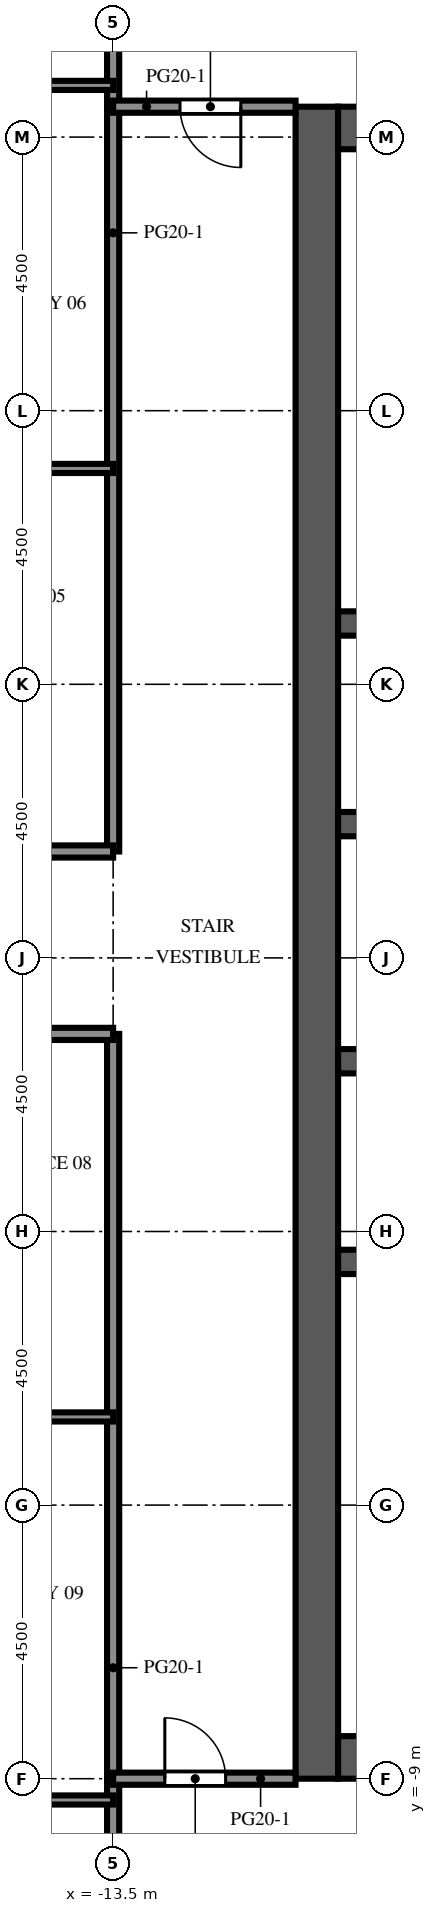
"""IFC4 building model, lengths in metres.
Left out: names, types, materials, properties, quantities, classifications, styles, units other than length and angle.
Written with IfcOpenShell. Run it as: python <this file> out.ifc"""

import sys

from ifc_helpers import new_model, si_unit, direction, frame, frame_2d, origin, place, context, subcontext, project, spatial, rectangle, extrude, element, fill, save


model = new_model("IFC4")
c1 = context("Model", 3, precision=1e-05, world=origin(), true_north=direction((0.0, 1.0)))
c2 = subcontext(c1, "Body", "Model", "MODEL_VIEW")
j1 = project(units=[si_unit("LENGTHUNIT", "METRE"), si_unit("PLANEANGLEUNIT", "RADIAN")], contexts=[c1])
p1 = place(None, origin())
s1 = spatial("IfcSite", under=j1, at=p1, CompositionType="ELEMENT")
p2 = place(p1, origin())
s2 = spatial("IfcBuilding", under=s1, at=p2, CompositionType="ELEMENT")
p3 = place(p2, frame((0.0, 0.0, 286.8)))
s3 = spatial("IfcBuildingStorey", under=s2, at=p3, CompositionType="ELEMENT", Elevation=286.8)
p4 = place(p3, frame((-10.15, -9.0, 0.0), z_axis=(0.0, 0.0, 1.0), x_axis=(0.0, 1.0, 0.0)))
e1 = element("IfcWall", 1, at=p4, inside=s3, PredefinedType="SHEAR", context=c2, shape_type="SweptSolid", body=[
    extrude(rectangle(XDim=27.5, YDim=0.7, at=frame_2d((13.75, 0.0))), origin(), (0.0, 0.0, 1.0), 4.1),
])
p5 = place(p4, frame((12.55, 0.0, 0.0)))
e2 = element("IfcOpeningElement", 2, at=p5, cuts=e1, PredefinedType="OPENING", context=c2, shape_type="SweptSolid", body=[
    extrude(rectangle(XDim=2.4, YDim=2.4, at=frame_2d((1.2, 1.2))), frame((0.0, 0.36, 0.0), z_axis=(0.0, -1.0, 0.0), x_axis=(1.0, 0.0, 0.0)), (0.0, 0.0, 1.0), 0.72),
])
p6 = place(p4, frame((6.825, 0.0, 0.0)))
e3 = element("IfcOpeningElement", 3, at=p6, cuts=e1, PredefinedType="OPENING", context=c2, shape_type="SweptSolid", body=[
    extrude(rectangle(XDim=1.2, YDim=2.1, at=frame_2d((0.6, 1.05))), frame((0.0, 0.36, 0.0), z_axis=(0.0, -1.0, 0.0), x_axis=(1.0, 0.0, 0.0)), (0.0, 0.0, 1.0), 0.72),
])
p7 = place(p4, frame((19.475, 0.0, 0.0)))
e4 = element("IfcOpeningElement", 4, at=p7, cuts=e1, PredefinedType="OPENING", context=c2, shape_type="SweptSolid", body=[
    extrude(rectangle(XDim=1.2, YDim=2.1, at=frame_2d((0.6, 1.05))), frame((0.0, 0.36, 0.0), z_axis=(0.0, -1.0, 0.0), x_axis=(1.0, 0.0, 0.0)), (0.0, 0.0, 1.0), 0.72),
])
for number, where, z_axis, x_axis in (
    (5, (-9.8, -8.65, 0.0), (0.0, 0.0, 1.0), (1.0, 0.0, 0.0)),
    (6, (-9.8, 18.15, 0.0), (0.0, 0.0, 1.0), (1.0, 0.0, 0.0)),
):
    element("IfcWall", number, at=place(p3, frame(where, z_axis=z_axis, x_axis=x_axis)), inside=s3, PredefinedType="SHEAR", context=c2, shape_type="SweptSolid", body=[
        extrude(rectangle(XDim=10.6, YDim=0.7, at=frame_2d((5.3, 0.0))), origin(), (0.0, 0.0, 1.0), 4.1),
    ])
p8 = place(p3, frame((-9.8, -0.5, 0.0), z_axis=(0.0, 0.0, 1.0), x_axis=(1.0, 0.0, 0.0)))
e7 = element("IfcWall", 7, at=p8, inside=s3, PredefinedType="SHEAR", context=c2, shape_type="SweptSolid", body=[
    extrude(rectangle(XDim=10.6, YDim=0.4, at=frame_2d((5.3, 0.0))), origin(), (0.0, 0.0, 1.0), 4.1),
])
p9 = place(p3, frame((-9.8, 2.8, 0.0), z_axis=(0.0, 0.0, 1.0), x_axis=(1.0, 0.0, 0.0)))
e8 = element("IfcWall", 8, at=p9, inside=s3, PredefinedType="SHEAR", context=c2, shape_type="SweptSolid", body=[
    extrude(rectangle(XDim=10.6, YDim=0.4, at=frame_2d((5.3, 0.0))), origin(), (0.0, 0.0, 1.0), 4.1),
])
p10 = place(p9, frame((0.688, 0.0, 0.0)))
e9 = element("IfcOpeningElement", 9, at=p10, cuts=e8, PredefinedType="OPENING", context=c2, shape_type="SweptSolid", body=[
    extrude(rectangle(XDim=1.1, YDim=2.1, at=frame_2d((0.55, 1.05))), frame((0.0, 0.21, 0.0), z_axis=(0.0, -1.0, 0.0), x_axis=(1.0, 0.0, 0.0)), (0.0, 0.0, 1.0), 0.42),
])
p11 = place(p9, frame((3.438, 0.0, 0.0)))
e10 = element("IfcOpeningElement", 10, at=p11, cuts=e8, PredefinedType="OPENING", context=c2, shape_type="SweptSolid", body=[
    extrude(rectangle(XDim=1.1, YDim=2.1, at=frame_2d((0.55, 1.05))), frame((0.0, 0.21, 0.0), z_axis=(0.0, -1.0, 0.0), x_axis=(1.0, 0.0, 0.0)), (0.0, 0.0, 1.0), 0.42),
])
p12 = place(p9, frame((6.113, 0.0, 0.0)))
e11 = element("IfcOpeningElement", 11, at=p12, cuts=e8, PredefinedType="OPENING", context=c2, shape_type="SweptSolid", body=[
    extrude(rectangle(XDim=1.0, YDim=2.1, at=frame_2d((0.5, 1.05))), frame((0.0, 0.21, 0.0), z_axis=(0.0, -1.0, 0.0), x_axis=(1.0, 0.0, 0.0)), (0.0, 0.0, 1.0), 0.42),
])
p13 = place(p9, frame((8.863, 0.0, 0.0)))
e12 = element("IfcOpeningElement", 12, at=p13, cuts=e8, PredefinedType="OPENING", context=c2, shape_type="SweptSolid", body=[
    extrude(rectangle(XDim=1.0, YDim=2.1, at=frame_2d((0.5, 1.05))), frame((0.0, 0.21, 0.0), z_axis=(0.0, -1.0, 0.0), x_axis=(1.0, 0.0, 0.0)), (0.0, 0.0, 1.0), 0.42),
])
p14 = place(p3, frame((-9.8, 6.7, 0.0), z_axis=(0.0, 0.0, 1.0), x_axis=(1.0, 0.0, 0.0)))
e13 = element("IfcWall", 13, at=p14, inside=s3, PredefinedType="SHEAR", context=c2, shape_type="SweptSolid", body=[
    extrude(rectangle(XDim=10.6, YDim=0.4, at=frame_2d((5.3, 0.0))), origin(), (0.0, 0.0, 1.0), 4.1),
])
p15 = place(p14, frame((3.438, 0.0, 0.0)))
e14 = element("IfcOpeningElement", 14, at=p15, cuts=e13, PredefinedType="OPENING", context=c2, shape_type="SweptSolid", body=[
    extrude(rectangle(XDim=1.1, YDim=2.1, at=frame_2d((0.55, 1.05))), frame((0.0, 0.21, 0.0), z_axis=(0.0, -1.0, 0.0), x_axis=(1.0, 0.0, 0.0)), (0.0, 0.0, 1.0), 0.42),
])
p16 = place(p14, frame((6.062, 0.0, 0.0)))
e15 = element("IfcOpeningElement", 15, at=p16, cuts=e13, PredefinedType="OPENING", context=c2, shape_type="SweptSolid", body=[
    extrude(rectangle(XDim=1.1, YDim=2.1, at=frame_2d((0.55, 1.05))), frame((0.0, 0.21, 0.0), z_axis=(0.0, -1.0, 0.0), x_axis=(1.0, 0.0, 0.0)), (0.0, 0.0, 1.0), 0.42),
])
p17 = place(p14, frame((8.812, 0.0, 0.0)))
e16 = element("IfcOpeningElement", 16, at=p17, cuts=e13, PredefinedType="OPENING", context=c2, shape_type="SweptSolid", body=[
    extrude(rectangle(XDim=1.1, YDim=2.1, at=frame_2d((0.55, 1.05))), frame((0.0, 0.21, 0.0), z_axis=(0.0, -1.0, 0.0), x_axis=(1.0, 0.0, 0.0)), (0.0, 0.0, 1.0), 0.42),
])
p18 = place(p14, frame((0.738, 0.0, 0.0)))
e17 = element("IfcOpeningElement", 17, at=p18, cuts=e13, PredefinedType="OPENING", context=c2, shape_type="SweptSolid", body=[
    extrude(rectangle(XDim=1.0, YDim=2.1, at=frame_2d((0.5, 1.05))), frame((0.0, 0.21, 0.0), z_axis=(0.0, -1.0, 0.0), x_axis=(1.0, 0.0, 0.0)), (0.0, 0.0, 1.0), 0.42),
])
p19 = place(p3, frame((-9.8, 10.0, 0.0), z_axis=(0.0, 0.0, 1.0), x_axis=(1.0, 0.0, 0.0)))
e18 = element("IfcWall", 18, at=p19, inside=s3, PredefinedType="SHEAR", context=c2, shape_type="SweptSolid", body=[
    extrude(rectangle(XDim=10.6, YDim=0.4, at=frame_2d((5.3, 0.0))), origin(), (0.0, 0.0, 1.0), 4.1),
])
p20 = place(p3, frame((-13.5, -17.6, 0.0), z_axis=(0.0, 0.0, 1.0), x_axis=(0.0, 1.0, 0.0)))
e19 = element("IfcWall", 19, at=p20, inside=s3, PredefinedType="PARTITIONING", context=c2, shape_type="SweptSolid", body=[
    extrude(rectangle(XDim=20.85, YDim=0.2, at=frame_2d((10.425, 0.0))), origin(), (0.0, 0.0, 1.0), 3.65),
])
p21 = place(p3, frame((-13.5, 6.25, 0.0), z_axis=(0.0, 0.0, 1.0), x_axis=(0.0, 1.0, 0.0)))
e20 = element("IfcWall", 20, at=p21, inside=s3, PredefinedType="PARTITIONING", context=c2, shape_type="SweptSolid", body=[
    extrude(rectangle(XDim=20.35, YDim=0.2, at=frame_2d((10.175, 0.0))), origin(), (0.0, 0.0, 1.0), 3.65),
])
p22 = place(p3, frame((-17.5, -9.35, 0.0), z_axis=(0.0, 0.0, 1.0), x_axis=(1.0, 0.0, 0.0)))
e21 = element("IfcWall", 21, at=p22, inside=s3, PredefinedType="PARTITIONING", context=c2, shape_type="SweptSolid", body=[
    extrude(rectangle(XDim=4.0, YDim=0.15, at=frame_2d((2.0, 0.0))), origin(), (0.0, 0.0, 1.0), 3.65),
])
p23 = place(p3, frame((-10.5, -9.0, 0.0), z_axis=(0.0, 0.0, 1.0), x_axis=(-1.0, 0.0, 0.0)))
e22 = element("IfcWall", 22, at=p23, inside=s3, PredefinedType="PARTITIONING", context=c2, shape_type="SweptSolid", body=[
    extrude(rectangle(XDim=3.0, YDim=0.2, at=frame_2d((1.5, 0.0))), origin(), (0.0, 0.0, 1.0), 3.65),
])
p24 = place(p23, frame((1.15, 0.0, 0.0)))
e23 = element("IfcOpeningElement", 23, at=p24, cuts=e22, PredefinedType="OPENING", context=c2, shape_type="SweptSolid", body=[
    extrude(rectangle(XDim=1.0, YDim=2.1, at=frame_2d((0.5, 1.05))), frame((0.0, 0.11, 0.0), z_axis=(0.0, -1.0, 0.0), x_axis=(1.0, 0.0, 0.0)), (0.0, 0.0, 1.0), 0.22),
])
p25 = place(p3, frame((-13.5, -3.05, 0.0), z_axis=(0.0, 0.0, 1.0), x_axis=(-1.0, 0.0, 0.0)))
e24 = element("IfcWall", 24, at=p25, inside=s3, PredefinedType="PARTITIONING", context=c2, shape_type="SweptSolid", body=[
    extrude(rectangle(XDim=8.85, YDim=0.15, at=frame_2d((4.425, 0.0))), origin(), (0.0, 0.0, 1.0), 3.65),
])
p26 = place(p25, frame((5.4, 0.0, 0.0)))
e25 = element("IfcOpeningElement", 25, at=p26, cuts=e24, PredefinedType="OPENING", context=c2, shape_type="SweptSolid", body=[
    extrude(rectangle(XDim=1.0, YDim=2.1, at=frame_2d((0.5, 1.05))), frame((0.0, 0.085, 0.0), z_axis=(0.0, -1.0, 0.0), x_axis=(1.0, 0.0, 0.0)), (0.0, 0.0, 1.0), 0.17),
])
p27 = place(p3, frame((-13.5, 3.25, 0.0), z_axis=(0.0, 0.0, 1.0), x_axis=(-1.0, 0.0, 0.0)))
e26 = element("IfcWall", 26, at=p27, inside=s3, PredefinedType="PARTITIONING", context=c2, shape_type="SweptSolid", body=[
    extrude(rectangle(XDim=8.85, YDim=0.2, at=frame_2d((4.425, 0.0))), origin(), (0.0, 0.0, 1.0), 3.65),
])
p28 = place(p27, frame((5.15, 0.0, 0.0)))
e27 = element("IfcOpeningElement", 27, at=p28, cuts=e26, PredefinedType="OPENING", context=c2, shape_type="SweptSolid", body=[
    extrude(rectangle(XDim=1.0, YDim=2.1, at=frame_2d((0.5, 1.05))), frame((0.0, 0.11, 0.0), z_axis=(0.0, -1.0, 0.0), x_axis=(1.0, 0.0, 0.0)), (0.0, 0.0, 1.0), 0.22),
])
p29 = place(p3, frame((-22.35, 6.25, 0.0), z_axis=(0.0, 0.0, 1.0), x_axis=(1.0, 0.0, 0.0)))
e28 = element("IfcWall", 28, at=p29, inside=s3, PredefinedType="PARTITIONING", context=c2, shape_type="SweptSolid", body=[
    extrude(rectangle(XDim=8.85, YDim=0.2, at=frame_2d((4.425, 0.0))), origin(), (0.0, 0.0, 1.0), 3.65),
])
p30 = place(p29, frame((3.45, 0.0, 0.0)))
e29 = element("IfcOpeningElement", 29, at=p30, cuts=e28, PredefinedType="OPENING", context=c2, shape_type="SweptSolid", body=[
    extrude(rectangle(XDim=1.0, YDim=2.1, at=frame_2d((0.5, 1.05))), frame((0.0, 0.11, 0.0), z_axis=(0.0, -1.0, 0.0), x_axis=(1.0, 0.0, 0.0)), (0.0, 0.0, 1.0), 0.22),
])
p31 = place(p3, frame((-22.35, 12.55, 0.0), z_axis=(0.0, 0.0, 1.0), x_axis=(1.0, 0.0, 0.0)))
e30 = element("IfcWall", 30, at=p31, inside=s3, PredefinedType="PARTITIONING", context=c2, shape_type="SweptSolid", body=[
    extrude(rectangle(XDim=8.85, YDim=0.15, at=frame_2d((4.425, 0.0))), origin(), (0.0, 0.0, 1.0), 3.65),
])
p32 = place(p31, frame((4.2, 0.0, 0.0)))
e31 = element("IfcOpeningElement", 31, at=p32, cuts=e30, PredefinedType="OPENING", context=c2, shape_type="SweptSolid", body=[
    extrude(rectangle(XDim=1.0, YDim=2.1, at=frame_2d((0.5, 1.05))), frame((0.0, 0.085, 0.0), z_axis=(0.0, -1.0, 0.0), x_axis=(1.0, 0.0, 0.0)), (0.0, 0.0, 1.0), 0.17),
])
p33 = place(p3, frame((-13.5, 18.5, 0.0), z_axis=(0.0, 0.0, 1.0), x_axis=(1.0, 0.0, 0.0)))
e32 = element("IfcWall", 32, at=p33, inside=s3, PredefinedType="PARTITIONING", context=c2, shape_type="SweptSolid", body=[
    extrude(rectangle(XDim=3.0, YDim=0.2, at=frame_2d((1.5, 0.0))), origin(), (0.0, 0.0, 1.0), 3.65),
])
p34 = place(p33, frame((1.1, 0.0, 0.0)))
e33 = element("IfcOpeningElement", 33, at=p34, cuts=e32, PredefinedType="OPENING", context=c2, shape_type="SweptSolid", body=[
    extrude(rectangle(XDim=1.0, YDim=2.1, at=frame_2d((0.5, 1.05))), frame((0.0, 0.11, 0.0), z_axis=(0.0, -1.0, 0.0), x_axis=(1.0, 0.0, 0.0)), (0.0, 0.0, 1.0), 0.22),
])
p35 = place(p3, frame((-22.35, 18.85, 0.0), z_axis=(0.0, 0.0, 1.0), x_axis=(1.0, 0.0, 0.0)))
e34 = element("IfcWall", 34, at=p35, inside=s3, PredefinedType="PARTITIONING", context=c2, shape_type="SweptSolid", body=[
    extrude(rectangle(XDim=8.85, YDim=0.15, at=frame_2d((4.425, 0.0))), origin(), (0.0, 0.0, 1.0), 3.65),
])
p36 = place(p35, frame((2.7, 0.0, 0.0)))
e35 = element("IfcOpeningElement", 35, at=p36, cuts=e34, PredefinedType="OPENING", context=c2, shape_type="SweptSolid", body=[
    extrude(rectangle(XDim=1.0, YDim=2.1, at=frame_2d((0.5, 1.05))), frame((0.0, 0.085, 0.0), z_axis=(0.0, -1.0, 0.0), x_axis=(1.0, 0.0, 0.0)), (0.0, 0.0, 1.0), 0.17),
])
p37 = place(p5, origin())
e36 = element("IfcDoor", 36, at=p37, inside=s3, OperationType="DOUBLE_DOOR_DOUBLE_SWING", PredefinedType="DOOR", context=c2, shape_type="SweptSolid", body=[
    extrude(rectangle(XDim=2.4, YDim=2.4, at=frame_2d((1.2, 1.2))), frame((0.0, 0.025, 0.0), z_axis=(0.0, -1.0, 0.0), x_axis=(1.0, 0.0, 0.0)), (0.0, 0.0, 1.0), 0.05),
])
fill(e2, e36)
p38 = place(p6, origin())
e37 = element("IfcDoor", 37, at=p38, inside=s3, OperationType="SINGLE_SWING_LEFT", PredefinedType="DOOR", context=c2, shape_type="SweptSolid", body=[
    extrude(rectangle(XDim=1.2, YDim=2.1, at=frame_2d((0.6, 1.05))), frame((0.0, 0.025, 0.0), z_axis=(0.0, -1.0, 0.0), x_axis=(1.0, 0.0, 0.0)), (0.0, 0.0, 1.0), 0.05),
])
fill(e3, e37)
p39 = place(p7, origin())
e38 = element("IfcDoor", 38, at=p39, inside=s3, OperationType="SINGLE_SWING_LEFT", PredefinedType="DOOR", context=c2, shape_type="SweptSolid", body=[
    extrude(rectangle(XDim=1.2, YDim=2.1, at=frame_2d((0.6, 1.05))), frame((0.0, 0.025, 0.0), z_axis=(0.0, -1.0, 0.0), x_axis=(1.0, 0.0, 0.0)), (0.0, 0.0, 1.0), 0.05),
])
fill(e4, e38)
p40 = place(p24, origin())
e39 = element("IfcDoor", 39, at=p40, inside=s3, OperationType="SINGLE_SWING_RIGHT", PredefinedType="DOOR", context=c2, shape_type="SweptSolid", body=[
    extrude(rectangle(XDim=1.0, YDim=2.1, at=frame_2d((0.5, 1.05))), frame((0.0, 0.025, 0.0), z_axis=(0.0, -1.0, 0.0), x_axis=(1.0, 0.0, 0.0)), (0.0, 0.0, 1.0), 0.05),
])
fill(e23, e39)
p41 = place(p34, origin())
e40 = element("IfcDoor", 40, at=p41, inside=s3, OperationType="SINGLE_SWING_RIGHT", PredefinedType="DOOR", context=c2, shape_type="SweptSolid", body=[
    extrude(rectangle(XDim=1.0, YDim=2.1, at=frame_2d((0.5, 1.05))), frame((0.0, 0.025, 0.0), z_axis=(0.0, -1.0, 0.0), x_axis=(1.0, 0.0, 0.0)), (0.0, 0.0, 1.0), 0.05),
])
fill(e33, e40)
save(model, sys.argv[1])
